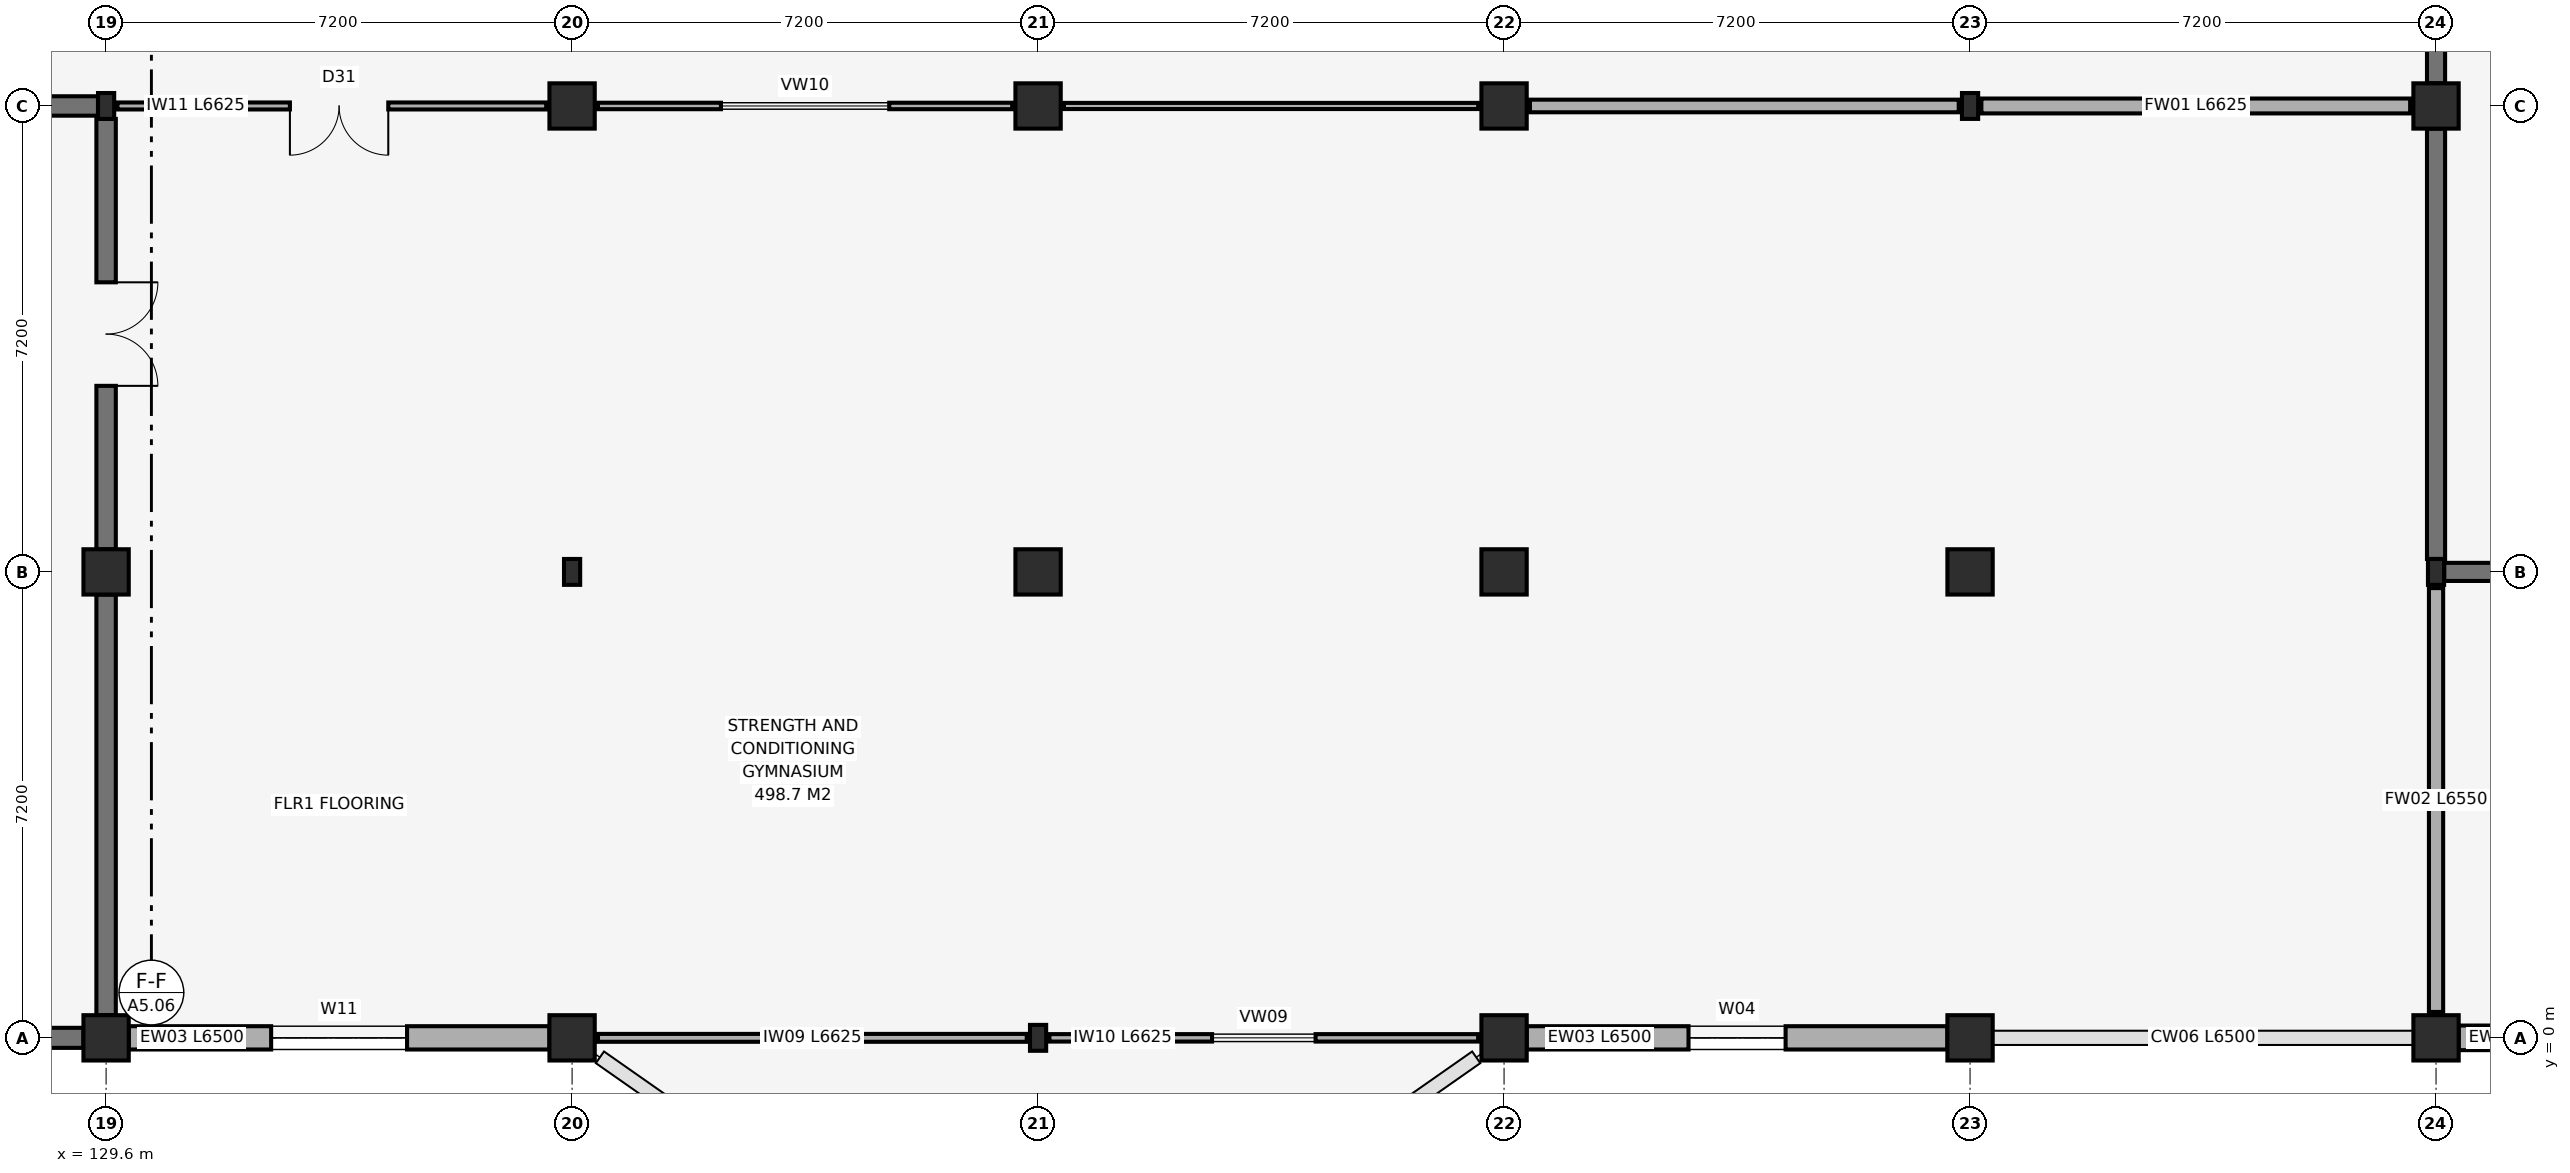
"""IFC4 building model, lengths in metres.
Left out: names, types, materials, properties, quantities, classifications, styles, units other than length and angle.
Written with IfcOpenShell. Run it as: python <this file> out.ifc"""

import sys

from ifc_helpers import new_model, si_unit, direction, frame, frame_2d, origin, origin_2d, place, context, subcontext, project, spatial, rectangle, hollow_rectangle, extrude, element, fill, save


model = new_model("IFC4")
c1 = context("Model", 3, precision=1e-05, world=origin(), true_north=direction((0.0, 1.0)))
c2 = subcontext(c1, "Body", "Model", "MODEL_VIEW")
j1 = project(units=[si_unit("LENGTHUNIT", "METRE"), si_unit("PLANEANGLEUNIT", "RADIAN")], contexts=[c1])
p1 = place(None, origin())
s1 = spatial("IfcSite", under=j1, at=p1, CompositionType="ELEMENT")
p2 = place(p1, origin())
s2 = spatial("IfcBuilding", under=s1, at=p2, CompositionType="ELEMENT")
p3 = place(p2, frame((0.0, 0.0, 10.2)))
s3 = spatial("IfcBuildingStorey", under=s2, at=p3, CompositionType="ELEMENT", Elevation=10.2)
for number, where, z_axis, x_axis in (
    (1, (129.6, 0.0, 0.0), (0.0, 0.0, 1.0), (1.0, 0.0, 0.0)),
    (2, (129.6, 7.2, 0.0), (0.0, 0.0, 1.0), (1.0, 0.0, 0.0)),
):
    element("IfcColumn", number, at=place(p3, frame(where, z_axis=z_axis, x_axis=x_axis)), inside=s3, PredefinedType="COLUMN", context=c2, shape_type="SweptSolid", body=[
        extrude(rectangle(XDim=0.7, YDim=0.7, at=origin_2d()), origin(), (0.0, 0.0, 1.0), 4.8),
    ])
p4 = place(p3, frame((129.6, 14.4, 0.0), z_axis=(0.0, 0.0, 1.0), x_axis=(1.0, 0.0, 0.0)))
e3 = element("IfcColumn", 3, at=p4, inside=s3, PredefinedType="COLUMN", context=c2, shape_type="SweptSolid", body=[
    extrude(hollow_rectangle(XDim=0.25, YDim=0.4, WallThickness=0.014, at=origin_2d()), origin(), (0.0, 0.0, 1.0), 4.8),
])
p5 = place(p3, frame((136.8, 0.0, 0.0), z_axis=(0.0, 0.0, 1.0), x_axis=(1.0, 0.0, 0.0)))
e4 = element("IfcColumn", 4, at=p5, inside=s3, PredefinedType="COLUMN", context=c2, shape_type="SweptSolid", body=[
    extrude(rectangle(XDim=0.7, YDim=0.7, at=origin_2d()), origin(), (0.0, 0.0, 1.0), 4.8),
])
p6 = place(p3, frame((136.8, 7.2, 0.0), z_axis=(0.0, 0.0, 1.0), x_axis=(1.0, 0.0, 0.0)))
e5 = element("IfcColumn", 5, at=p6, inside=s3, PredefinedType="COLUMN", context=c2, shape_type="SweptSolid", body=[
    extrude(hollow_rectangle(XDim=0.25, YDim=0.4, WallThickness=0.014, at=origin_2d()), origin(), (0.0, 0.0, 1.0), 4.8),
])
p7 = place(p3, frame((136.8, 14.4, 0.0), z_axis=(0.0, 0.0, 1.0), x_axis=(1.0, 0.0, 0.0)))
e6 = element("IfcColumn", 6, at=p7, inside=s3, PredefinedType="COLUMN", context=c2, shape_type="SweptSolid", body=[
    extrude(rectangle(XDim=0.7, YDim=0.7, at=origin_2d()), origin(), (0.0, 0.0, 1.0), 4.8),
])
p8 = place(p3, frame((144.0, 0.0, 0.0), z_axis=(0.0, 0.0, 1.0), x_axis=(1.0, 0.0, 0.0)))
e7 = element("IfcColumn", 7, at=p8, inside=s3, PredefinedType="COLUMN", context=c2, shape_type="SweptSolid", body=[
    extrude(hollow_rectangle(XDim=0.25, YDim=0.4, WallThickness=0.014, at=origin_2d()), origin(), (0.0, 0.0, 1.0), 4.8),
])
for number, where, z_axis, x_axis in (
    (8, (144.0, 7.2, 0.0), (0.0, 0.0, 1.0), (1.0, 0.0, 0.0)),
    (9, (144.0, 14.4, 0.0), (0.0, 0.0, 1.0), (1.0, 0.0, 0.0)),
    (10, (151.2, 0.0, 0.0), (0.0, 0.0, 1.0), (1.0, 0.0, 0.0)),
    (11, (151.2, 7.2, 0.0), (0.0, 0.0, 1.0), (1.0, 0.0, 0.0)),
    (12, (151.2, 14.4, 0.0), (0.0, 0.0, 1.0), (1.0, 0.0, 0.0)),
    (13, (158.4, 0.0, 0.0), (0.0, 0.0, 1.0), (1.0, 0.0, 0.0)),
    (14, (158.4, 7.2, 0.0), (0.0, 0.0, 1.0), (1.0, 0.0, 0.0)),
):
    element("IfcColumn", number, at=place(p3, frame(where, z_axis=z_axis, x_axis=x_axis)), inside=s3, PredefinedType="COLUMN", context=c2, shape_type="SweptSolid", body=[
        extrude(rectangle(XDim=0.7, YDim=0.7, at=origin_2d()), origin(), (0.0, 0.0, 1.0), 4.8),
    ])
p9 = place(p3, frame((158.4, 14.4, 0.0), z_axis=(0.0, 0.0, 1.0), x_axis=(1.0, 0.0, 0.0)))
e15 = element("IfcColumn", 15, at=p9, inside=s3, PredefinedType="COLUMN", context=c2, shape_type="SweptSolid", body=[
    extrude(hollow_rectangle(XDim=0.25, YDim=0.4, WallThickness=0.014, at=origin_2d()), origin(), (0.0, 0.0, 1.0), 4.8),
])
p10 = place(p3, frame((165.6, 0.0, 0.0), z_axis=(0.0, 0.0, 1.0), x_axis=(1.0, 0.0, 0.0)))
e16 = element("IfcColumn", 16, at=p10, inside=s3, PredefinedType="COLUMN", context=c2, shape_type="SweptSolid", body=[
    extrude(rectangle(XDim=0.7, YDim=0.7, at=origin_2d()), origin(), (0.0, 0.0, 1.0), 4.8),
])
p11 = place(p3, frame((165.6, 7.2, 0.0), z_axis=(0.0, 0.0, 1.0), x_axis=(1.0, 0.0, 0.0)))
e17 = element("IfcColumn", 17, at=p11, inside=s3, PredefinedType="COLUMN", context=c2, shape_type="SweptSolid", body=[
    extrude(hollow_rectangle(XDim=0.25, YDim=0.4, WallThickness=0.014, at=origin_2d()), origin(), (0.0, 0.0, 1.0), 4.8),
])
p12 = place(p3, frame((165.6, 14.4, 0.0), z_axis=(0.0, 0.0, 1.0), x_axis=(1.0, 0.0, 0.0)))
e18 = element("IfcColumn", 18, at=p12, inside=s3, PredefinedType="COLUMN", context=c2, shape_type="SweptSolid", body=[
    extrude(rectangle(XDim=0.7, YDim=0.7, at=origin_2d()), origin(), (0.0, 0.0, 1.0), 4.8),
])
p13 = place(p3, frame((129.95, 0.0, 0.0), z_axis=(0.0, 0.0, 1.0), x_axis=(1.0, 0.0, 0.0)))
e19 = element("IfcWall", 19, at=p13, inside=s3, PredefinedType="SOLIDWALL", context=c2, shape_type="SweptSolid", body=[
    extrude(rectangle(XDim=6.5, YDim=0.36, at=frame_2d((3.25, 0.0))), origin(), (0.0, 0.0, 1.0), 3.76),
])
p14 = place(p13, frame((2.2, 0.0, 0.95)))
e20 = element("IfcOpeningElement", 20, at=p14, cuts=e19, PredefinedType="OPENING", context=c2, shape_type="SweptSolid", body=[
    extrude(rectangle(XDim=2.1, YDim=1.75, at=frame_2d((1.05, 0.875))), frame((0.0, 0.195, 0.0), z_axis=(0.0, -1.0, 0.0), x_axis=(1.0, 0.0, 0.0)), (0.0, 0.0, 1.0), 0.39),
])
p15 = place(p3, frame((151.55, 0.0, 0.0), z_axis=(0.0, 0.0, 1.0), x_axis=(1.0, 0.0, 0.0)))
e21 = element("IfcWall", 21, at=p15, inside=s3, PredefinedType="SOLIDWALL", context=c2, shape_type="SweptSolid", body=[
    extrude(rectangle(XDim=6.5, YDim=0.36, at=frame_2d((3.25, 0.0))), origin(), (0.0, 0.0, 1.0), 3.76),
])
p16 = place(p15, frame((2.5, 0.0, 0.95)))
e22 = element("IfcOpeningElement", 22, at=p16, cuts=e21, PredefinedType="OPENING", context=c2, shape_type="SweptSolid", body=[
    extrude(rectangle(XDim=1.5, YDim=2.2, at=frame_2d((0.75, 1.1))), frame((0.0, 0.195, 0.0), z_axis=(0.0, -1.0, 0.0), x_axis=(1.0, 0.0, 0.0)), (0.0, 0.0, 1.0), 0.39),
])
p17 = place(p3, frame((165.95, 0.0, 0.0), z_axis=(0.0, 0.0, 1.0), x_axis=(1.0, 0.0, 0.0)))
e23 = element("IfcWall", 23, at=p17, inside=s3, PredefinedType="SOLIDWALL", context=c2, shape_type="SweptSolid", body=[
    extrude(rectangle(XDim=6.725, YDim=0.38, at=frame_2d((3.363, 0.0))), origin(), (0.0, 0.0, 1.0), 3.76),
])
p18 = place(p17, frame((2.163, 0.0, 0.95)))
e24 = element("IfcOpeningElement", 24, at=p18, cuts=e23, PredefinedType="OPENING", context=c2, shape_type="SweptSolid", body=[
    extrude(rectangle(XDim=2.4, YDim=1.75, at=frame_2d((1.2, 0.875))), frame((0.0, 0.205, 0.0), z_axis=(0.0, -1.0, 0.0), x_axis=(1.0, 0.0, 0.0)), (0.0, 0.0, 1.0), 0.41),
])
p19 = place(p3, frame((122.75, 0.0, 0.0), z_axis=(0.0, 0.0, 1.0), x_axis=(1.0, 0.0, 0.0)))
e25 = element("IfcWall", 25, at=p19, inside=s3, PredefinedType="SHEAR", context=c2, shape_type="SweptSolid", body=[
    extrude(rectangle(XDim=6.5, YDim=0.31, at=frame_2d((3.25, 0.0))), origin(), (0.0, 0.0, 1.0), 4.56),
])
p20 = place(p3, frame((122.75, 14.4, 0.0), z_axis=(0.0, 0.0, 1.0), x_axis=(1.0, 0.0, 0.0)))
e26 = element("IfcWall", 26, at=p20, inside=s3, PredefinedType="SHEAR", context=c2, shape_type="SweptSolid", body=[
    extrude(rectangle(XDim=6.725, YDim=0.3, at=frame_2d((3.363, 0.0))), origin(), (0.0, 0.0, 1.0), 4.56),
])
p21 = place(p3, frame((129.6, 0.35, 0.0), z_axis=(0.0, 0.0, 1.0), x_axis=(0.0, 1.0, 0.0)))
e27 = element("IfcWall", 27, at=p21, inside=s3, PredefinedType="SHEAR", context=c2, shape_type="SweptSolid", body=[
    extrude(rectangle(XDim=6.5, YDim=0.3, at=frame_2d((3.25, 0.0))), origin(), (0.0, 0.0, 1.0), 4.56),
])
p22 = place(p3, frame((129.6, 7.55, 0.0), z_axis=(0.0, 0.0, 1.0), x_axis=(0.0, 1.0, 0.0)))
e28 = element("IfcWall", 28, at=p22, inside=s3, PredefinedType="SHEAR", context=c2, shape_type="SweptSolid", body=[
    extrude(rectangle(XDim=6.65, YDim=0.3, at=frame_2d((3.325, 0.0))), origin(), (0.0, 0.0, 1.0), 4.56),
])
p23 = place(p22, frame((2.525, 0.0, 0.0)))
e29 = element("IfcOpeningElement", 29, at=p23, cuts=e28, PredefinedType="OPENING", context=c2, shape_type="SweptSolid", body=[
    extrude(rectangle(XDim=1.6, YDim=2.2, at=frame_2d((0.8, 1.1))), frame((0.0, 0.165, 0.0), z_axis=(0.0, -1.0, 0.0), x_axis=(1.0, 0.0, 0.0)), (0.0, 0.0, 1.0), 0.33),
])
p24 = place(p3, frame((165.725, 7.2, 0.0), z_axis=(0.0, 0.0, 1.0), x_axis=(1.0, 0.0, 0.0)))
e30 = element("IfcWall", 30, at=p24, inside=s3, PredefinedType="SHEAR", context=c2, shape_type="SweptSolid", body=[
    extrude(rectangle(XDim=6.725, YDim=0.28, at=frame_2d((3.362, 0.0))), origin(), (0.0, 0.0, 1.0), 4.56),
])
p25 = place(p3, frame((165.6, 7.4, 0.0), z_axis=(0.0, 0.0, 1.0), x_axis=(0.0, 1.0, 0.0)))
e31 = element("IfcWall", 31, at=p25, inside=s3, PredefinedType="SHEAR", context=c2, shape_type="SweptSolid", body=[
    extrude(rectangle(XDim=6.65, YDim=0.28, at=frame_2d((3.325, 0.0))), origin(), (0.0, 0.0, 1.0), 4.56),
])
p26 = place(p3, frame((165.6, 14.75, 0.0), z_axis=(0.0, 0.0, 1.0), x_axis=(0.0, 1.0, 0.0)))
e32 = element("IfcWall", 32, at=p26, inside=s3, PredefinedType="SHEAR", context=c2, shape_type="SweptSolid", body=[
    extrude(rectangle(XDim=6.5, YDim=0.28, at=frame_2d((3.25, 0.0))), origin(), (0.0, 0.0, 1.0), 4.56),
])
p27 = place(p26, frame((2.45, 0.0, 0.0)))
e33 = element("IfcOpeningElement", 33, at=p27, cuts=e32, PredefinedType="OPENING", context=c2, shape_type="SweptSolid", body=[
    extrude(rectangle(XDim=1.6, YDim=2.2, at=frame_2d((0.8, 1.1))), frame((0.0, 0.155, 0.0), z_axis=(0.0, -1.0, 0.0), x_axis=(1.0, 0.0, 0.0)), (0.0, 0.0, 1.0), 0.31),
])
p28 = place(p3, frame((137.2, 0.0, 0.0), z_axis=(0.0, 0.0, 1.0), x_axis=(1.0, 0.0, 0.0)))
e34 = element("IfcWall", 34, at=p28, inside=s3, PredefinedType="PARTITIONING", context=c2, shape_type="SweptSolid", body=[
    extrude(rectangle(XDim=6.625, YDim=0.122, at=frame_2d((3.312, 0.0))), origin(), (0.0, 0.0, 1.0), 3.76),
])
p29 = place(p3, frame((144.175, 0.0, 0.0), z_axis=(0.0, 0.0, 1.0), x_axis=(1.0, 0.0, 0.0)))
e35 = element("IfcWall", 35, at=p29, inside=s3, PredefinedType="PARTITIONING", context=c2, shape_type="SweptSolid", body=[
    extrude(rectangle(XDim=6.625, YDim=0.115, at=frame_2d((3.312, 0.0))), origin(), (0.0, 0.0, 1.0), 3.76),
])
p30 = place(p29, frame((2.513, 0.0, 0.95)))
e36 = element("IfcOpeningElement", 36, at=p30, cuts=e35, PredefinedType="OPENING", context=c2, shape_type="SweptSolid", body=[
    extrude(rectangle(XDim=1.6, YDim=1.35, at=frame_2d((0.8, 0.675))), frame((0.0, 0.072, 0.0), z_axis=(0.0, -1.0, 0.0), x_axis=(1.0, 0.0, 0.0)), (0.0, 0.0, 1.0), 0.145),
])
p31 = place(p3, frame((129.775, 14.4, 0.0), z_axis=(0.0, 0.0, 1.0), x_axis=(1.0, 0.0, 0.0)))
e37 = element("IfcWall", 37, at=p31, inside=s3, PredefinedType="PARTITIONING", context=c2, shape_type="SweptSolid", body=[
    extrude(rectangle(XDim=6.625, YDim=0.108, at=frame_2d((3.312, 0.0))), origin(), (0.0, 0.0, 1.0), 4.072),
])
p32 = place(p31, frame((2.665, 0.0, 0.0)))
e38 = element("IfcOpeningElement", 38, at=p32, cuts=e37, PredefinedType="OPENING", context=c2, shape_type="SweptSolid", body=[
    extrude(rectangle(XDim=1.52, YDim=2.2, at=frame_2d((0.76, 1.1))), frame((0.0, 0.069, 0.0), z_axis=(0.0, -1.0, 0.0), x_axis=(1.0, 0.0, 0.0)), (0.0, 0.0, 1.0), 0.138),
])
p33 = place(p3, frame((137.2, 14.4, 0.0), z_axis=(0.0, 0.0, 1.0), x_axis=(1.0, 0.0, 0.0)))
e39 = element("IfcWall", 39, at=p33, inside=s3, PredefinedType="PARTITIONING", context=c2, shape_type="SweptSolid", body=[
    extrude(rectangle(XDim=6.4, YDim=0.1, at=frame_2d((3.2, 0.0))), origin(), (0.0, 0.0, 1.0), 4.072),
])
p34 = place(p33, frame((1.9, 0.0, 0.95)))
e40 = element("IfcOpeningElement", 40, at=p34, cuts=e39, PredefinedType="OPENING", context=c2, shape_type="SweptSolid", body=[
    extrude(rectangle(XDim=2.6, YDim=1.2, at=frame_2d((1.3, 0.6))), frame((0.0, 0.065, 0.0), z_axis=(0.0, -1.0, 0.0), x_axis=(1.0, 0.0, 0.0)), (0.0, 0.0, 1.0), 0.13),
])
p35 = place(p3, frame((144.4, 14.4, 0.0), z_axis=(0.0, 0.0, 1.0), x_axis=(1.0, 0.0, 0.0)))
e41 = element("IfcWall", 41, at=p35, inside=s3, PredefinedType="PARTITIONING", context=c2, shape_type="SweptSolid", body=[
    extrude(rectangle(XDim=6.4, YDim=0.095, at=frame_2d((3.2, 0.0))), origin(), (0.0, 0.0, 1.0), 4.072),
])
p36 = place(p3, frame((151.6, 14.4, 0.0), z_axis=(0.0, 0.0, 1.0), x_axis=(1.0, 0.0, 0.0)))
e42 = element("IfcWall", 42, at=p36, inside=s3, PredefinedType="PARTITIONING", context=c2, shape_type="SweptSolid", body=[
    extrude(rectangle(XDim=6.625, YDim=0.195, at=frame_2d((3.312, 0.0))), origin(), (0.0, 0.0, 1.0), 4.072),
])
p37 = place(p3, frame((158.575, 14.4, 0.0), z_axis=(0.0, 0.0, 1.0), x_axis=(1.0, 0.0, 0.0)))
e43 = element("IfcWall", 43, at=p37, inside=s3, PredefinedType="SOLIDWALL", context=c2, shape_type="SweptSolid", body=[
    extrude(rectangle(XDim=6.625, YDim=0.23, at=frame_2d((3.312, 0.0))), origin(), (0.0, 0.0, 1.0), 4.072),
])
p38 = place(p3, frame((165.6, 0.4, 0.0), z_axis=(0.0, 0.0, 1.0), x_axis=(0.0, 1.0, 0.0)))
e44 = element("IfcWall", 44, at=p38, inside=s3, PredefinedType="SOLIDWALL", context=c2, shape_type="SweptSolid", body=[
    extrude(rectangle(XDim=6.55, YDim=0.22, at=frame_2d((3.275, 0.0))), origin(), (0.0, 0.0, 1.0), 4.072),
])
p39 = place(p14, origin())
e45 = element("IfcWindow", 45, at=p39, inside=s3, PartitioningType="SINGLE_PANEL", PredefinedType="WINDOW", context=c2, shape_type="SweptSolid", body=[
    extrude(rectangle(XDim=2.1, YDim=1.75, at=frame_2d((1.05, 0.875))), frame((0.0, 0.03, 0.0), z_axis=(0.0, -1.0, 0.0), x_axis=(1.0, 0.0, 0.0)), (0.0, 0.0, 1.0), 0.06),
])
fill(e20, e45)
p40 = place(p16, origin())
e46 = element("IfcWindow", 46, at=p40, inside=s3, PartitioningType="SINGLE_PANEL", PredefinedType="WINDOW", context=c2, shape_type="SweptSolid", body=[
    extrude(rectangle(XDim=1.5, YDim=2.2, at=frame_2d((0.75, 1.1))), frame((0.0, 0.03, 0.0), z_axis=(0.0, -1.0, 0.0), x_axis=(1.0, 0.0, 0.0)), (0.0, 0.0, 1.0), 0.06),
])
fill(e22, e46)
p41 = place(p23, frame((1.6, 0.0, 0.0), z_axis=(0.0, 0.0, 1.0), x_axis=(-1.0, 0.0, 0.0)))
e47 = element("IfcDoor", 47, at=p41, inside=s3, OperationType="DOUBLE_SWING_LEFT", PredefinedType="DOOR", context=c2, shape_type="SweptSolid", body=[
    extrude(rectangle(XDim=1.6, YDim=2.2, at=frame_2d((0.8, 1.1))), frame((0.0, 0.025, 0.0), z_axis=(0.0, -1.0, 0.0), x_axis=(1.0, 0.0, 0.0)), (0.0, 0.0, 1.0), 0.05),
])
fill(e29, e47)
p42 = place(p30, origin())
e48 = element("IfcWindow", 48, at=p42, inside=s3, PartitioningType="SINGLE_PANEL", PredefinedType="WINDOW", context=c2, shape_type="SweptSolid", body=[
    extrude(rectangle(XDim=1.6, YDim=1.35, at=frame_2d((0.8, 0.675))), frame((0.0, 0.03, 0.0), z_axis=(0.0, -1.0, 0.0), x_axis=(1.0, 0.0, 0.0)), (0.0, 0.0, 1.0), 0.06),
])
fill(e36, e48)
p43 = place(p32, frame((1.52, 0.0, 0.0), z_axis=(0.0, 0.0, 1.0), x_axis=(-1.0, 0.0, 0.0)))
e49 = element("IfcDoor", 49, at=p43, inside=s3, OperationType="DOUBLE_SWING_LEFT", PredefinedType="DOOR", context=c2, shape_type="SweptSolid", body=[
    extrude(rectangle(XDim=1.52, YDim=2.2, at=frame_2d((0.76, 1.1))), frame((0.0, 0.025, 0.0), z_axis=(0.0, -1.0, 0.0), x_axis=(1.0, 0.0, 0.0)), (0.0, 0.0, 1.0), 0.05),
])
fill(e38, e49)
p44 = place(p34, origin())
e50 = element("IfcWindow", 50, at=p44, inside=s3, PartitioningType="SINGLE_PANEL", PredefinedType="WINDOW", context=c2, shape_type="SweptSolid", body=[
    extrude(rectangle(XDim=2.6, YDim=1.2, at=frame_2d((1.3, 0.6))), frame((0.0, 0.03, 0.0), z_axis=(0.0, -1.0, 0.0), x_axis=(1.0, 0.0, 0.0)), (0.0, 0.0, 1.0), 0.06),
])
fill(e40, e50)
save(model, sys.argv[1])
